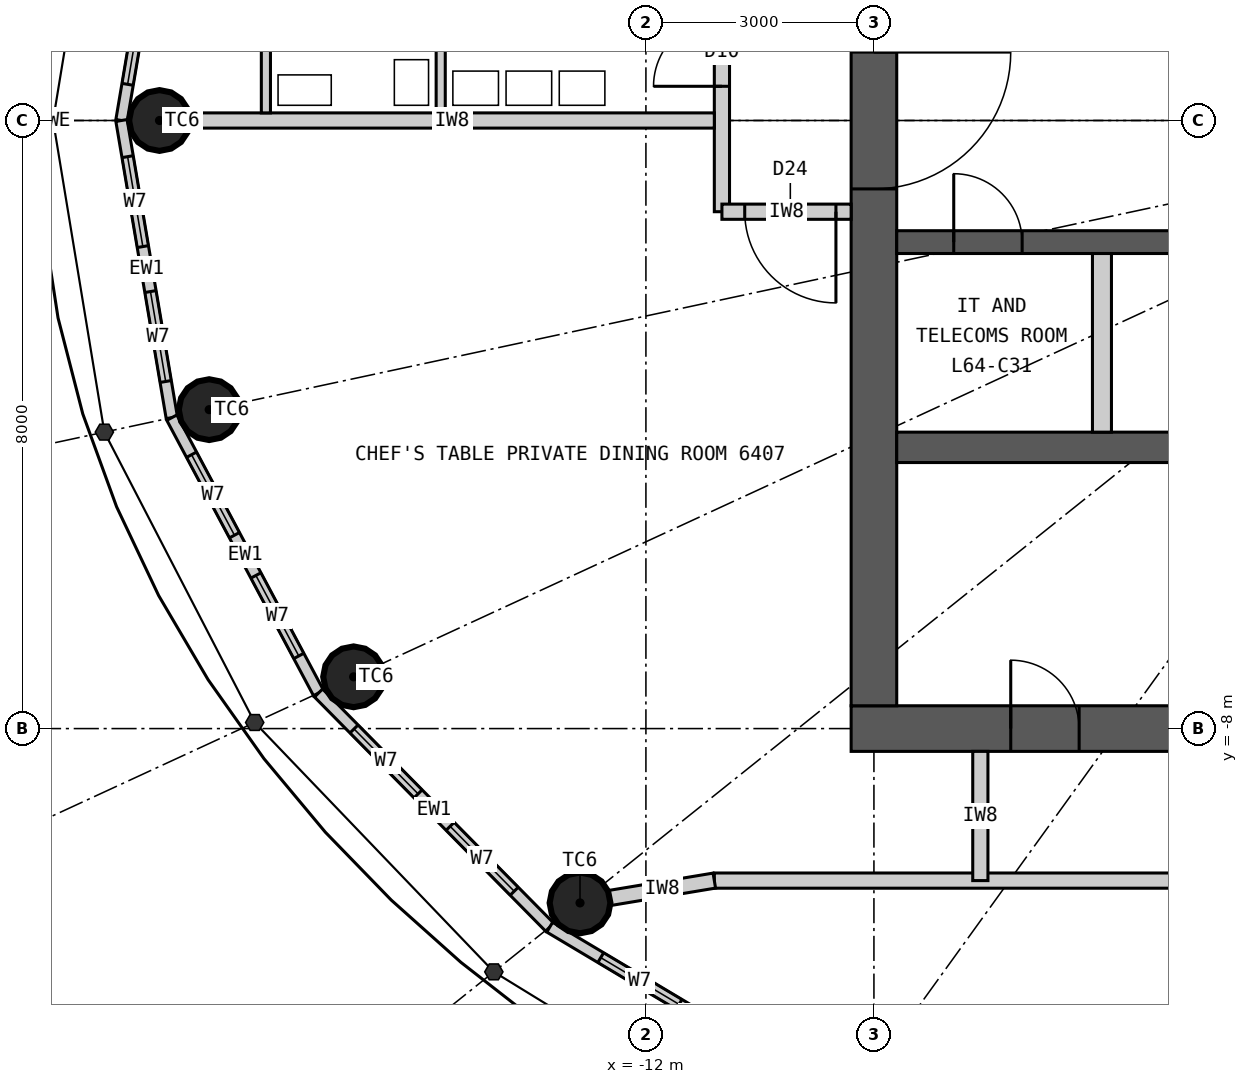
"""IFC4 building model, lengths in metres.
Left out: names, types, materials, properties, quantities, classifications, styles, units other than length and angle.
Written with IfcOpenShell. Run it as: python <this file> out.ifc"""

import sys

from ifc_helpers import new_model, si_unit, direction, frame, frame_2d, origin, origin_2d, place, context, subcontext, project, spatial, rectangle, circle, extrude, element, fill, save


model = new_model("IFC4")
c1 = context("Model", 3, precision=1e-05, world=origin(), true_north=direction((0.0, 1.0)))
c2 = subcontext(c1, "Body", "Model", "MODEL_VIEW")
j1 = project(units=[si_unit("LENGTHUNIT", "METRE"), si_unit("PLANEANGLEUNIT", "RADIAN")], contexts=[c1])
p1 = place(None, origin())
s1 = spatial("IfcSite", under=j1, at=p1, CompositionType="ELEMENT")
p2 = place(p1, origin())
s2 = spatial("IfcBuilding", under=s1, at=p2, CompositionType="ELEMENT")
p3 = place(p2, frame((0.0, 0.0, 237.3)))
s3 = spatial("IfcBuildingStorey", under=s2, at=p3, CompositionType="ELEMENT", Elevation=237.3)
for number, where, z_axis, x_axis in (
    (1, (-18.4, 0.0, 0.0), (0.0, 0.0, 1.0), (1.0, 0.0, 0.0)),
    (2, (-17.746, -3.804, 0.0), (0.0, 0.0, 1.0), (1.0, 0.0, 0.0)),
    (3, (-15.846, -7.319, 0.0), (0.0, 0.0, 1.0), (1.0, 0.0, 0.0)),
    (4, (-12.867, -10.294, 0.0), (0.0, 0.0, 1.0), (1.0, 0.0, 0.0)),
):
    element("IfcColumn", number, at=place(p3, frame(where, z_axis=z_axis, x_axis=x_axis)), inside=s3, PredefinedType="COLUMN", context=c2, shape_type="SweptSolid", body=[
        extrude(circle(Radius=0.4, at=origin_2d()), origin(), (0.0, 0.0, 1.0), 5.4),
    ])
p4 = place(p3, frame((9.3, -8.0, 0.0), z_axis=(0.0, 0.0, 1.0), x_axis=(-1.0, 0.0, 0.0)))
e5 = element("IfcWall", 5, at=p4, inside=s3, PredefinedType="SHEAR", context=c2, shape_type="SweptSolid", body=[
    extrude(rectangle(XDim=18.6, YDim=0.6, at=frame_2d((9.3, 0.0))), origin(), (0.0, 0.0, 1.0), 5.4),
])
p5 = place(p4, frame((8.0, 0.0, 0.0)))
e6 = element("IfcOpeningElement", 6, at=p5, cuts=e5, PredefinedType="OPENING", context=c2, shape_type="SweptSolid", body=[
    extrude(rectangle(XDim=1.2, YDim=2.2, at=frame_2d((0.6, 1.1))), frame((0.0, 0.31, 0.0), z_axis=(0.0, -1.0, 0.0), x_axis=(1.0, 0.0, 0.0)), (0.0, 0.0, 1.0), 0.62),
])
p6 = place(p4, frame((15.6, 0.0, 0.0)))
e7 = element("IfcOpeningElement", 7, at=p6, cuts=e5, PredefinedType="OPENING", context=c2, shape_type="SweptSolid", body=[
    extrude(rectangle(XDim=0.9, YDim=2.2, at=frame_2d((0.45, 1.1))), frame((0.0, 0.31, 0.0), z_axis=(0.0, -1.0, 0.0), x_axis=(1.0, 0.0, 0.0)), (0.0, 0.0, 1.0), 0.62),
])
p7 = place(p3, frame((-9.0, 7.7, 0.0), z_axis=(0.0, 0.0, 1.0), x_axis=(0.0, -1.0, 0.0)))
e8 = element("IfcWall", 8, at=p7, inside=s3, PredefinedType="SHEAR", context=c2, shape_type="SweptSolid", body=[
    extrude(rectangle(XDim=15.4, YDim=0.6, at=frame_2d((7.7, 0.0))), origin(), (0.0, 0.0, 1.0), 5.4),
])
p8 = place(p7, frame((6.8, 0.0, 0.0)))
e9 = element("IfcOpeningElement", 9, at=p8, cuts=e8, PredefinedType="OPENING", context=c2, shape_type="SweptSolid", body=[
    extrude(rectangle(XDim=1.8, YDim=2.2, at=frame_2d((0.9, 1.1))), frame((0.0, 0.31, 0.0), z_axis=(0.0, -1.0, 0.0), x_axis=(1.0, 0.0, 0.0)), (0.0, 0.0, 1.0), 0.62),
])
p9 = place(p3, frame((-8.7, -4.3, 0.0), z_axis=(0.0, 0.0, 1.0), x_axis=(1.0, 0.0, 0.0)))
e10 = element("IfcWall", 10, at=p9, inside=s3, PredefinedType="SHEAR", context=c2, shape_type="SweptSolid", body=[
    extrude(rectangle(XDim=17.4, YDim=0.4, at=frame_2d((8.7, 0.0))), origin(), (0.0, 0.0, 1.0), 5.4),
])
p10 = place(p3, frame((-8.7, -1.6, 0.0), z_axis=(0.0, 0.0, 1.0), x_axis=(1.0, 0.0, 0.0)))
e11 = element("IfcWall", 11, at=p10, inside=s3, PredefinedType="SHEAR", context=c2, shape_type="SweptSolid", body=[
    extrude(rectangle(XDim=17.4, YDim=0.3, at=frame_2d((8.7, 0.0))), origin(), (0.0, 0.0, 1.0), 5.4),
])
p11 = place(p10, frame((12.4, 0.0, 0.0)))
e12 = element("IfcOpeningElement", 12, at=p11, cuts=e11, PredefinedType="OPENING", context=c2, shape_type="SweptSolid", body=[
    extrude(rectangle(XDim=1.6, YDim=2.4, at=frame_2d((0.8, 1.2))), frame((0.0, 0.16, 0.0), z_axis=(0.0, -1.0, 0.0), x_axis=(1.0, 0.0, 0.0)), (0.0, 0.0, 1.0), 0.32),
])
p12 = place(p10, frame((15.5, 0.0, 0.0)))
e13 = element("IfcOpeningElement", 13, at=p12, cuts=e11, PredefinedType="OPENING", context=c2, shape_type="SweptSolid", body=[
    extrude(rectangle(XDim=1.4, YDim=2.4, at=frame_2d((0.7, 1.2))), frame((0.0, 0.16, 0.0), z_axis=(0.0, -1.0, 0.0), x_axis=(1.0, 0.0, 0.0)), (0.0, 0.0, 1.0), 0.32),
])
p13 = place(p10, frame((0.75, 0.0, 0.0)))
e14 = element("IfcOpeningElement", 14, at=p13, cuts=e11, PredefinedType="OPENING", context=c2, shape_type="SweptSolid", body=[
    extrude(rectangle(XDim=0.9, YDim=2.2, at=frame_2d((0.45, 1.1))), frame((0.0, 0.16, 0.0), z_axis=(0.0, -1.0, 0.0), x_axis=(1.0, 0.0, 0.0)), (0.0, 0.0, 1.0), 0.32),
])
p14 = place(p10, frame((6.75, 0.0, 0.0)))
e15 = element("IfcOpeningElement", 15, at=p14, cuts=e11, PredefinedType="OPENING", context=c2, shape_type="SweptSolid", body=[
    extrude(rectangle(XDim=0.9, YDim=2.2, at=frame_2d((0.45, 1.1))), frame((0.0, 0.16, 0.0), z_axis=(0.0, -1.0, 0.0), x_axis=(1.0, 0.0, 0.0)), (0.0, 0.0, 1.0), 0.32),
])
p15 = place(p3, frame((-6.0, -4.1, 0.0), z_axis=(0.0, 0.0, 1.0), x_axis=(0.0, 1.0, 0.0)))
e16 = element("IfcWall", 16, at=p15, inside=s3, PredefinedType="PARTITIONING", context=c2, shape_type="SweptSolid", body=[
    extrude(rectangle(XDim=2.35, YDim=0.25, at=frame_2d((1.175, 0.0))), origin(), (0.0, 0.0, 1.0), 5.4),
])
p16 = place(p3, frame((-18.238, 3.909, 0.0), z_axis=(0.0, 0.0, 1.0), x_axis=(-0.166984464914, -0.985959526795, 0.0)))
e17 = element("IfcWall", 17, at=p16, inside=s3, PredefinedType="ELEMENTEDWALL", context=c2, shape_type="SweptSolid", body=[
    extrude(rectangle(XDim=3.965, YDim=0.15, at=frame_2d((1.982, 0.0))), origin(), (0.0, 0.0, 1.0), 5.15),
])
p17 = place(p16, frame((0.483, 0.0, 0.5)))
e18 = element("IfcOpeningElement", 18, at=p17, cuts=e17, PredefinedType="OPENING", context=c2, shape_type="SweptSolid", body=[
    extrude(rectangle(XDim=1.2, YDim=3.6, at=frame_2d((0.6, 1.8))), frame((0.0, 0.085, 0.0), z_axis=(0.0, -1.0, 0.0), x_axis=(1.0, 0.0, 0.0)), (0.0, 0.0, 1.0), 0.17),
])
p18 = place(p16, frame((2.282, 0.0, 0.5)))
e19 = element("IfcOpeningElement", 19, at=p18, cuts=e17, PredefinedType="OPENING", context=c2, shape_type="SweptSolid", body=[
    extrude(rectangle(XDim=1.2, YDim=3.6, at=frame_2d((0.6, 1.8))), frame((0.0, 0.085, 0.0), z_axis=(0.0, -1.0, 0.0), x_axis=(1.0, 0.0, 0.0)), (0.0, 0.0, 1.0), 0.17),
])
p19 = place(p3, frame((-18.9, 0.0, 0.0), z_axis=(0.0, 0.0, 1.0), x_axis=(0.166984464914, -0.985959526795, 0.0)))
e20 = element("IfcWall", 20, at=p19, inside=s3, PredefinedType="ELEMENTEDWALL", context=c2, shape_type="SweptSolid", body=[
    extrude(rectangle(XDim=3.965, YDim=0.15, at=frame_2d((1.982, 0.0))), origin(), (0.0, 0.0, 1.0), 5.15),
])
p20 = place(p19, frame((0.483, 0.0, 0.5)))
e21 = element("IfcOpeningElement", 21, at=p20, cuts=e20, PredefinedType="OPENING", context=c2, shape_type="SweptSolid", body=[
    extrude(rectangle(XDim=1.2, YDim=3.6, at=frame_2d((0.6, 1.8))), frame((0.0, 0.085, 0.0), z_axis=(0.0, -1.0, 0.0), x_axis=(1.0, 0.0, 0.0)), (0.0, 0.0, 1.0), 0.17),
])
p21 = place(p19, frame((2.282, 0.0, 0.5)))
e22 = element("IfcOpeningElement", 22, at=p21, cuts=e20, PredefinedType="OPENING", context=c2, shape_type="SweptSolid", body=[
    extrude(rectangle(XDim=1.2, YDim=3.6, at=frame_2d((0.6, 1.8))), frame((0.0, 0.085, 0.0), z_axis=(0.0, -1.0, 0.0), x_axis=(1.0, 0.0, 0.0)), (0.0, 0.0, 1.0), 0.17),
])
p22 = place(p3, frame((-18.238, -3.909, 0.0), z_axis=(0.0, 0.0, 1.0), x_axis=(0.470282591286, -0.882515883332, 0.0)))
e23 = element("IfcWall", 23, at=p22, inside=s3, PredefinedType="ELEMENTEDWALL", context=c2, shape_type="SweptSolid", body=[
    extrude(rectangle(XDim=4.105, YDim=0.15, at=frame_2d((2.052, 0.0))), origin(), (0.0, 0.0, 1.0), 5.15),
])
p23 = place(p22, frame((0.552, 0.0, 0.5)))
e24 = element("IfcOpeningElement", 24, at=p23, cuts=e23, PredefinedType="OPENING", context=c2, shape_type="SweptSolid", body=[
    extrude(rectangle(XDim=1.2, YDim=3.6, at=frame_2d((0.6, 1.8))), frame((0.0, 0.085, 0.0), z_axis=(0.0, -1.0, 0.0), x_axis=(1.0, 0.0, 0.0)), (0.0, 0.0, 1.0), 0.17),
])
p24 = place(p22, frame((2.353, 0.0, 0.5)))
e25 = element("IfcOpeningElement", 25, at=p24, cuts=e23, PredefinedType="OPENING", context=c2, shape_type="SweptSolid", body=[
    extrude(rectangle(XDim=1.2, YDim=3.6, at=frame_2d((0.6, 1.8))), frame((0.0, 0.085, 0.0), z_axis=(0.0, -1.0, 0.0), x_axis=(1.0, 0.0, 0.0)), (0.0, 0.0, 1.0), 0.17),
])
p25 = place(p3, frame((-16.307, -7.532, 0.0), z_axis=(0.0, 0.0, 1.0), x_axis=(0.702523956258, -0.711660095048, 0.0)))
e26 = element("IfcWall", 26, at=p25, inside=s3, PredefinedType="ELEMENTEDWALL", context=c2, shape_type="SweptSolid", body=[
    extrude(rectangle(XDim=4.329, YDim=0.15, at=frame_2d((2.165, 0.0))), origin(), (0.0, 0.0, 1.0), 5.15),
])
p26 = place(p25, frame((0.665, 0.0, 0.5)))
e27 = element("IfcOpeningElement", 27, at=p26, cuts=e26, PredefinedType="OPENING", context=c2, shape_type="SweptSolid", body=[
    extrude(rectangle(XDim=1.2, YDim=3.6, at=frame_2d((0.6, 1.8))), frame((0.0, 0.085, 0.0), z_axis=(0.0, -1.0, 0.0), x_axis=(1.0, 0.0, 0.0)), (0.0, 0.0, 1.0), 0.17),
])
p27 = place(p25, frame((2.465, 0.0, 0.5)))
e28 = element("IfcOpeningElement", 28, at=p27, cuts=e26, PredefinedType="OPENING", context=c2, shape_type="SweptSolid", body=[
    extrude(rectangle(XDim=1.2, YDim=3.6, at=frame_2d((0.6, 1.8))), frame((0.0, 0.085, 0.0), z_axis=(0.0, -1.0, 0.0), x_axis=(1.0, 0.0, 0.0)), (0.0, 0.0, 1.0), 0.17),
])
p28 = place(p3, frame((-13.266, -10.613, 0.0), z_axis=(0.0, 0.0, 1.0), x_axis=(0.858849230109, -0.512228464594, 0.0)))
e29 = element("IfcWall", 29, at=p28, inside=s3, PredefinedType="ELEMENTEDWALL", context=c2, shape_type="SweptSolid", body=[
    extrude(rectangle(XDim=4.564, YDim=0.15, at=frame_2d((2.282, 0.0))), origin(), (0.0, 0.0, 1.0), 5.15),
])
p29 = place(p28, frame((0.782, 0.0, 0.5)))
e30 = element("IfcOpeningElement", 30, at=p29, cuts=e29, PredefinedType="OPENING", context=c2, shape_type="SweptSolid", body=[
    extrude(rectangle(XDim=1.2, YDim=3.6, at=frame_2d((0.6, 1.8))), frame((0.0, 0.085, 0.0), z_axis=(0.0, -1.0, 0.0), x_axis=(1.0, 0.0, 0.0)), (0.0, 0.0, 1.0), 0.17),
])
p30 = place(p28, frame((2.582, 0.0, 0.5)))
e31 = element("IfcOpeningElement", 31, at=p30, cuts=e29, PredefinedType="OPENING", context=c2, shape_type="SweptSolid", body=[
    extrude(rectangle(XDim=1.2, YDim=3.6, at=frame_2d((0.6, 1.8))), frame((0.0, 0.085, 0.0), z_axis=(0.0, -1.0, 0.0), x_axis=(1.0, 0.0, 0.0)), (0.0, 0.0, 1.0), 0.17),
])
p31 = place(p3, frame((11.1, -10.0, 0.0), z_axis=(0.0, 0.0, 1.0), x_axis=(-1.0, 0.0, 0.0)))
e32 = element("IfcWall", 32, at=p31, inside=s3, PredefinedType="PARTITIONING", context=c2, shape_type="SweptSolid", body=[
    extrude(rectangle(XDim=22.2, YDim=0.2, at=frame_2d((11.1, 0.0))), origin(), (0.0, 0.0, 1.0), 5.15),
])
p32 = place(p31, frame((14.059, 0.0, 0.0)))
e33 = element("IfcOpeningElement", 33, at=p32, cuts=e32, PredefinedType="OPENING", context=c2, shape_type="SweptSolid", body=[
    extrude(rectangle(XDim=1.8, YDim=2.4, at=frame_2d((0.9, 1.2))), frame((0.0, 0.11, 0.0), z_axis=(0.0, -1.0, 0.0), x_axis=(1.0, 0.0, 0.0)), (0.0, 0.0, 1.0), 0.22),
])
p33 = place(p3, frame((-11.0, 9.9, 0.0), z_axis=(0.0, 0.0, 1.0), x_axis=(0.0, -1.0, 0.0)))
e34 = element("IfcWall", 34, at=p33, inside=s3, PredefinedType="PARTITIONING", context=c2, shape_type="SweptSolid", body=[
    extrude(rectangle(XDim=11.1, YDim=0.2, at=frame_2d((5.55, 0.0))), origin(), (0.0, 0.0, 1.0), 5.15),
])
p34 = place(p33, frame((1.45, 0.0, 0.0)))
e35 = element("IfcOpeningElement", 35, at=p34, cuts=e34, PredefinedType="OPENING", context=c2, shape_type="SweptSolid", body=[
    extrude(rectangle(XDim=1.2, YDim=2.2, at=frame_2d((0.6, 1.1))), frame((0.0, 0.11, 0.0), z_axis=(0.0, -1.0, 0.0), x_axis=(1.0, 0.0, 0.0)), (0.0, 0.0, 1.0), 0.22),
])
p35 = place(p33, frame((8.55, 0.0, 0.0)))
e36 = element("IfcOpeningElement", 36, at=p35, cuts=e34, PredefinedType="OPENING", context=c2, shape_type="SweptSolid", body=[
    extrude(rectangle(XDim=0.9, YDim=2.1, at=frame_2d((0.45, 1.05))), frame((0.0, 0.11, 0.0), z_axis=(0.0, -1.0, 0.0), x_axis=(1.0, 0.0, 0.0)), (0.0, 0.0, 1.0), 0.22),
])
p36 = place(p33, frame((5.05, 0.0, 0.0)))
e37 = element("IfcOpeningElement", 37, at=p36, cuts=e34, PredefinedType="OPENING", context=c2, shape_type="SweptSolid", body=[
    extrude(rectangle(XDim=0.9, YDim=2.1, at=frame_2d((0.45, 1.05))), frame((0.0, 0.11, 0.0), z_axis=(0.0, -1.0, 0.0), x_axis=(1.0, 0.0, 0.0)), (0.0, 0.0, 1.0), 0.22),
])
p37 = place(p3, frame((-11.1, 0.0, 0.0), z_axis=(0.0, 0.0, 1.0), x_axis=(-1.0, 0.0, 0.0)))
e38 = element("IfcWall", 38, at=p37, inside=s3, PredefinedType="PARTITIONING", context=c2, shape_type="SweptSolid", body=[
    extrude(rectangle(XDim=6.9, YDim=0.2, at=frame_2d((3.45, 0.0))), origin(), (0.0, 0.0, 1.0), 4.3),
])
p38 = place(p3, frame((-9.3, -1.2, 0.0), z_axis=(0.0, 0.0, 1.0), x_axis=(-1.0, 0.0, 0.0)))
e39 = element("IfcWall", 39, at=p38, inside=s3, PredefinedType="PARTITIONING", context=c2, shape_type="SweptSolid", body=[
    extrude(rectangle(XDim=1.7, YDim=0.2, at=frame_2d((0.85, 0.0))), origin(), (0.0, 0.0, 1.0), 5.15),
])
p39 = place(p38, frame((0.2, 0.0, 0.0)))
e40 = element("IfcOpeningElement", 40, at=p39, cuts=e39, PredefinedType="OPENING", context=c2, shape_type="SweptSolid", body=[
    extrude(rectangle(XDim=1.2, YDim=2.2, at=frame_2d((0.6, 1.1))), frame((0.0, 0.11, 0.0), z_axis=(0.0, -1.0, 0.0), x_axis=(1.0, 0.0, 0.0)), (0.0, 0.0, 1.0), 0.22),
])
p40 = place(p3, frame((-7.6, -8.3, 0.0), z_axis=(0.0, 0.0, 1.0), x_axis=(0.0, -1.0, 0.0)))
e41 = element("IfcWall", 41, at=p40, inside=s3, PredefinedType="PARTITIONING", context=c2, shape_type="SweptSolid", body=[
    extrude(rectangle(XDim=1.7, YDim=0.2, at=frame_2d((0.85, 0.0))), origin(), (0.0, 0.0, 1.0), 5.15),
])
p41 = place(p3, frame((-11.1, -10.0, 0.0), z_axis=(0.0, 0.0, 1.0), x_axis=(-0.986474439415, -0.163915162144, 0.0)))
e42 = element("IfcWall", 42, at=p41, inside=s3, PredefinedType="PARTITIONING", context=c2, shape_type="SweptSolid", body=[
    extrude(rectangle(XDim=1.391, YDim=0.2, at=frame_2d((0.696, 0.0))), origin(), (0.0, 0.0, 1.0), 4.3),
])
p42 = place(p3, frame((-14.7, 0.1, 0.0), z_axis=(0.0, 0.0, 1.0), x_axis=(0.0, 1.0, 0.0)))
e43 = element("IfcWall", 43, at=p42, inside=s3, PredefinedType="PARTITIONING", context=c2, shape_type="SweptSolid", body=[
    extrude(rectangle(XDim=7.01, YDim=0.12, at=frame_2d((3.505, 0.0))), origin(), (0.0, 0.0, 1.0), 5.15),
])
p43 = place(p3, frame((-17.0, 0.1, 0.0), z_axis=(0.0, 0.0, 1.0), x_axis=(0.0, 1.0, 0.0)))
e44 = element("IfcWall", 44, at=p43, inside=s3, PredefinedType="PARTITIONING", context=c2, shape_type="SweptSolid", body=[
    extrude(rectangle(XDim=2.41, YDim=0.12, at=frame_2d((1.205, 0.0))), origin(), (0.0, 0.0, 1.0), 5.15),
])
p44 = place(p18, origin())
e45 = element("IfcWindow", 45, at=p44, inside=s3, PartitioningType="SINGLE_PANEL", PredefinedType="WINDOW", context=c2, shape_type="SweptSolid", body=[
    extrude(rectangle(XDim=1.2, YDim=3.6, at=frame_2d((0.6, 1.8))), frame((0.0, 0.03, 0.0), z_axis=(0.0, -1.0, 0.0), x_axis=(1.0, 0.0, 0.0)), (0.0, 0.0, 1.0), 0.06),
])
fill(e19, e45)
p45 = place(p20, origin())
e46 = element("IfcWindow", 46, at=p45, inside=s3, PartitioningType="SINGLE_PANEL", PredefinedType="WINDOW", context=c2, shape_type="SweptSolid", body=[
    extrude(rectangle(XDim=1.2, YDim=3.6, at=frame_2d((0.6, 1.8))), frame((0.0, 0.03, 0.0), z_axis=(0.0, -1.0, 0.0), x_axis=(1.0, 0.0, 0.0)), (0.0, 0.0, 1.0), 0.06),
])
fill(e21, e46)
p46 = place(p21, origin())
e47 = element("IfcWindow", 47, at=p46, inside=s3, PartitioningType="SINGLE_PANEL", PredefinedType="WINDOW", context=c2, shape_type="SweptSolid", body=[
    extrude(rectangle(XDim=1.2, YDim=3.6, at=frame_2d((0.6, 1.8))), frame((0.0, 0.03, 0.0), z_axis=(0.0, -1.0, 0.0), x_axis=(1.0, 0.0, 0.0)), (0.0, 0.0, 1.0), 0.06),
])
fill(e22, e47)
p47 = place(p23, origin())
e48 = element("IfcWindow", 48, at=p47, inside=s3, PartitioningType="SINGLE_PANEL", PredefinedType="WINDOW", context=c2, shape_type="SweptSolid", body=[
    extrude(rectangle(XDim=1.2, YDim=3.6, at=frame_2d((0.6, 1.8))), frame((0.0, 0.03, 0.0), z_axis=(0.0, -1.0, 0.0), x_axis=(1.0, 0.0, 0.0)), (0.0, 0.0, 1.0), 0.06),
])
fill(e24, e48)
p48 = place(p24, origin())
e49 = element("IfcWindow", 49, at=p48, inside=s3, PartitioningType="SINGLE_PANEL", PredefinedType="WINDOW", context=c2, shape_type="SweptSolid", body=[
    extrude(rectangle(XDim=1.2, YDim=3.6, at=frame_2d((0.6, 1.8))), frame((0.0, 0.03, 0.0), z_axis=(0.0, -1.0, 0.0), x_axis=(1.0, 0.0, 0.0)), (0.0, 0.0, 1.0), 0.06),
])
fill(e25, e49)
p49 = place(p26, origin())
e50 = element("IfcWindow", 50, at=p49, inside=s3, PartitioningType="SINGLE_PANEL", PredefinedType="WINDOW", context=c2, shape_type="SweptSolid", body=[
    extrude(rectangle(XDim=1.2, YDim=3.6, at=frame_2d((0.6, 1.8))), frame((0.0, 0.03, 0.0), z_axis=(0.0, -1.0, 0.0), x_axis=(1.0, 0.0, 0.0)), (0.0, 0.0, 1.0), 0.06),
])
fill(e27, e50)
p50 = place(p27, origin())
e51 = element("IfcWindow", 51, at=p50, inside=s3, PartitioningType="SINGLE_PANEL", PredefinedType="WINDOW", context=c2, shape_type="SweptSolid", body=[
    extrude(rectangle(XDim=1.2, YDim=3.6, at=frame_2d((0.6, 1.8))), frame((0.0, 0.03, 0.0), z_axis=(0.0, -1.0, 0.0), x_axis=(1.0, 0.0, 0.0)), (0.0, 0.0, 1.0), 0.06),
])
fill(e28, e51)
p51 = place(p29, origin())
e52 = element("IfcWindow", 52, at=p51, inside=s3, PartitioningType="SINGLE_PANEL", PredefinedType="WINDOW", context=c2, shape_type="SweptSolid", body=[
    extrude(rectangle(XDim=1.2, YDim=3.6, at=frame_2d((0.6, 1.8))), frame((0.0, 0.03, 0.0), z_axis=(0.0, -1.0, 0.0), x_axis=(1.0, 0.0, 0.0)), (0.0, 0.0, 1.0), 0.06),
])
fill(e30, e52)
p52 = place(p39, origin())
e53 = element("IfcDoor", 53, at=p52, inside=s3, OperationType="SINGLE_SWING_LEFT", PredefinedType="DOOR", context=c2, shape_type="SweptSolid", body=[
    extrude(rectangle(XDim=1.2, YDim=2.2, at=frame_2d((0.6, 1.1))), frame((0.0, 0.025, 0.0), z_axis=(0.0, -1.0, 0.0), x_axis=(1.0, 0.0, 0.0)), (0.0, 0.0, 1.0), 0.05),
])
fill(e40, e53)
p53 = place(p35, origin())
e54 = element("IfcDoor", 54, at=p53, inside=s3, OperationType="SINGLE_SWING_RIGHT", PredefinedType="DOOR", context=c2, shape_type="SweptSolid", body=[
    extrude(rectangle(XDim=0.9, YDim=2.1, at=frame_2d((0.45, 1.05))), frame((0.0, 0.025, 0.0), z_axis=(0.0, -1.0, 0.0), x_axis=(1.0, 0.0, 0.0)), (0.0, 0.0, 1.0), 0.05),
])
fill(e36, e54)
p54 = place(p6, origin())
e55 = element("IfcDoor", 55, at=p54, inside=s3, OperationType="SINGLE_SWING_RIGHT", PredefinedType="DOOR", context=c2, shape_type="SweptSolid", body=[
    extrude(rectangle(XDim=0.9, YDim=2.2, at=frame_2d((0.45, 1.1))), frame((0.0, 0.025, 0.0), z_axis=(0.0, -1.0, 0.0), x_axis=(1.0, 0.0, 0.0)), (0.0, 0.0, 1.0), 0.05),
])
fill(e7, e55)
p55 = place(p13, origin())
e56 = element("IfcDoor", 56, at=p55, inside=s3, OperationType="SINGLE_SWING_LEFT", PredefinedType="DOOR", context=c2, shape_type="SweptSolid", body=[
    extrude(rectangle(XDim=0.9, YDim=2.2, at=frame_2d((0.45, 1.1))), frame((0.0, 0.025, 0.0), z_axis=(0.0, -1.0, 0.0), x_axis=(1.0, 0.0, 0.0)), (0.0, 0.0, 1.0), 0.05),
])
fill(e14, e56)
p56 = place(p8, origin())
e57 = element("IfcDoor", 57, at=p56, inside=s3, OperationType="DOUBLE_DOOR_DOUBLE_SWING", PredefinedType="DOOR", context=c2, shape_type="SweptSolid", body=[
    extrude(rectangle(XDim=1.8, YDim=2.2, at=frame_2d((0.9, 1.1))), frame((0.0, 0.025, 0.0), z_axis=(0.0, -1.0, 0.0), x_axis=(1.0, 0.0, 0.0)), (0.0, 0.0, 1.0), 0.05),
])
fill(e9, e57)
save(model, sys.argv[1])
